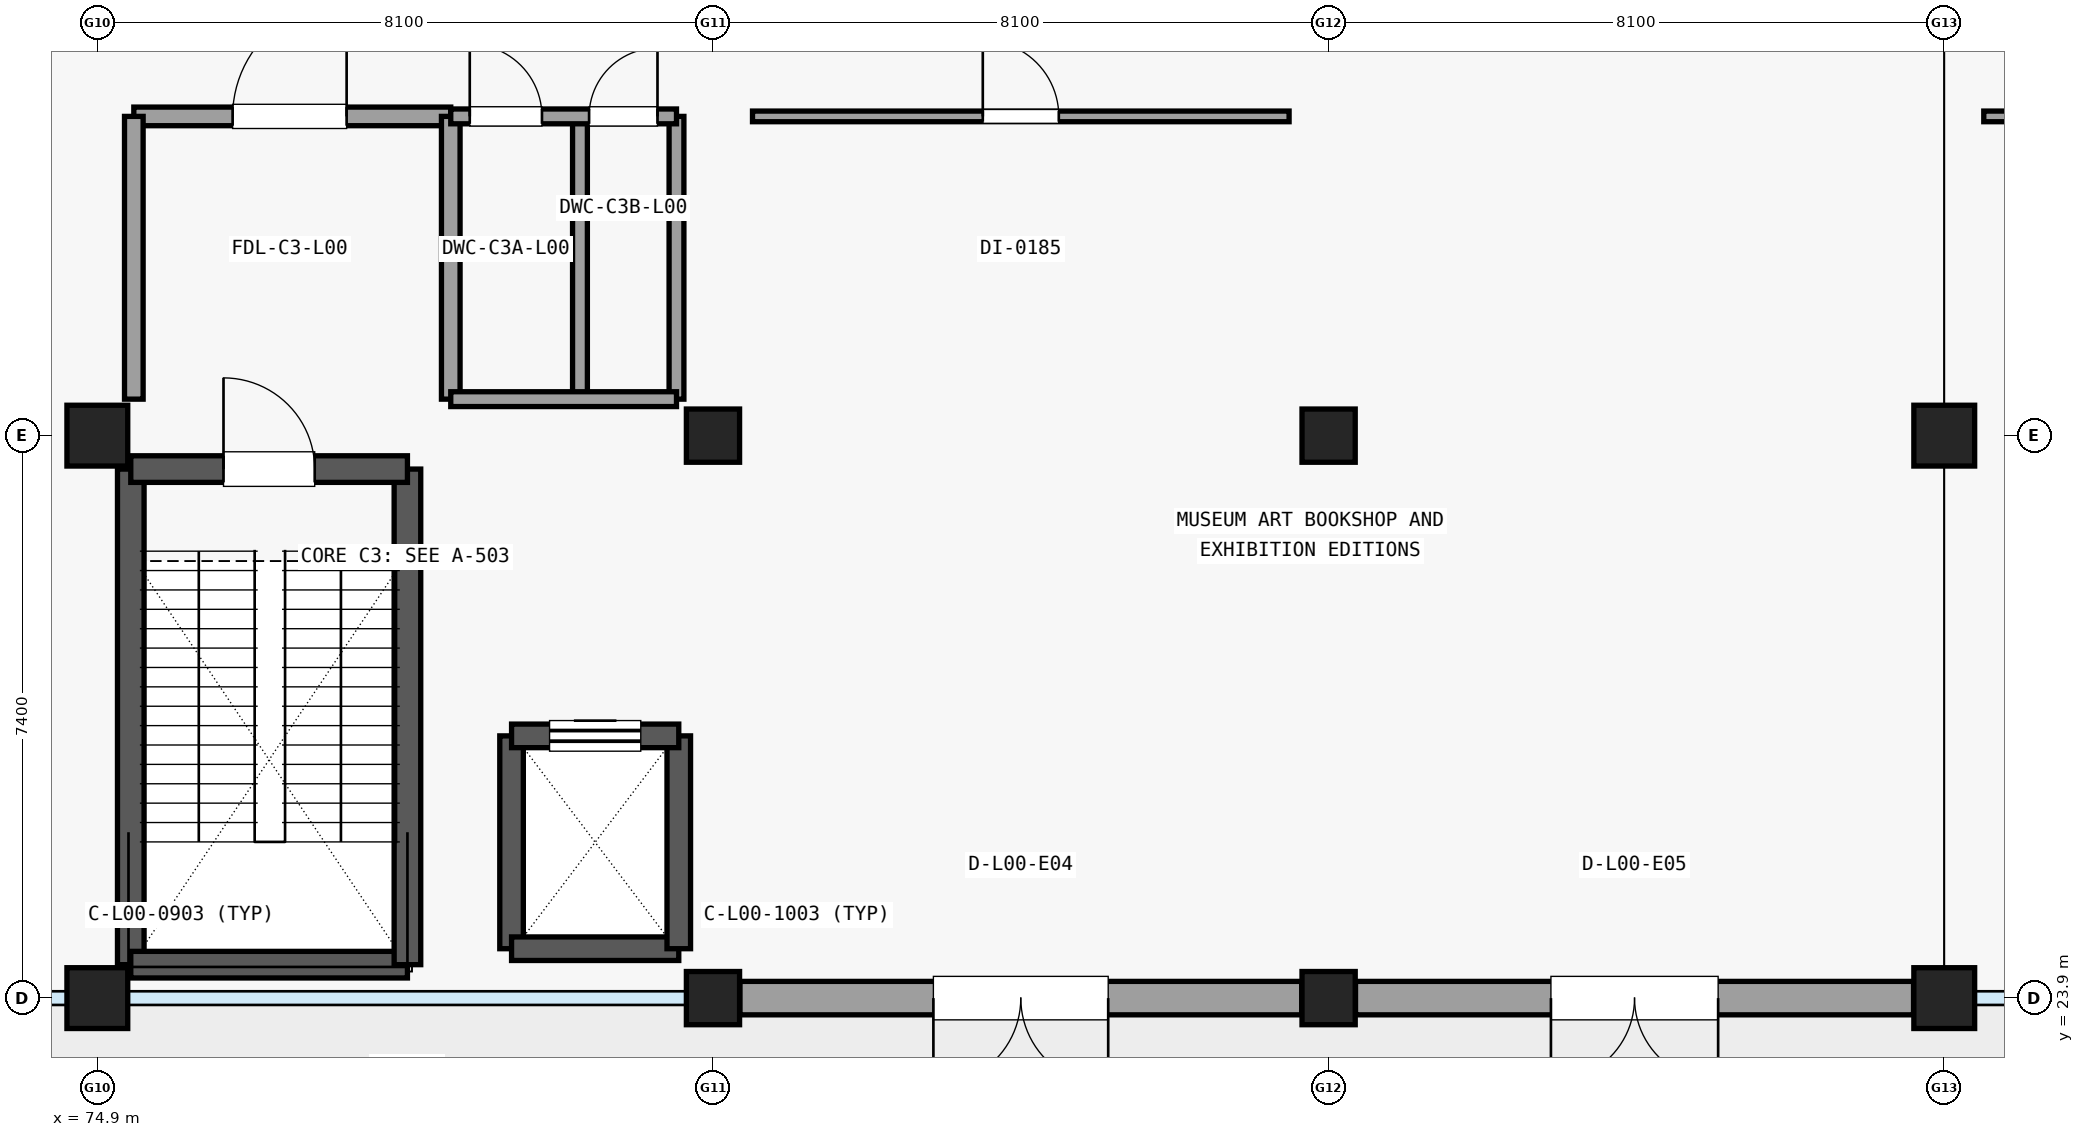
"""IFC4 building model, lengths in metres.
Left out: names, types, materials, properties, quantities, classifications, styles, units other than length and angle.
Written with IfcOpenShell. Run it as: python <this file> out.ifc"""

import sys

from ifc_helpers import new_model, si_unit, direction, frame, frame_2d, origin, origin_2d, place, context, subcontext, project, spatial, rectangle, extrude, element, fill, save


model = new_model("IFC4")
c1 = context("Model", 3, precision=1e-05, world=origin(), true_north=direction((0.0, 1.0)))
c2 = subcontext(c1, "Body", "Model", "MODEL_VIEW")
j1 = project(units=[si_unit("LENGTHUNIT", "METRE"), si_unit("PLANEANGLEUNIT", "RADIAN")], contexts=[c1])
p1 = place(None, origin())
s1 = spatial("IfcSite", under=j1, at=p1, CompositionType="ELEMENT")
p2 = place(p1, origin())
s2 = spatial("IfcBuilding", under=s1, at=p2, CompositionType="ELEMENT")
p3 = place(p2, origin())
s3 = spatial("IfcBuildingStorey", under=s2, at=p3, CompositionType="ELEMENT", Elevation=0.0)
for number, where, z_axis, x_axis in (
    (1, (74.9, 23.9, 0.0), (0.0, 0.0, 1.0), (1.0, 0.0, 0.0)),
    (2, (74.9, 31.3, 0.0), (0.0, 0.0, 1.0), (1.0, 0.0, 0.0)),
):
    element("IfcColumn", number, at=place(p3, frame(where, z_axis=z_axis, x_axis=x_axis)), inside=s3, PredefinedType="COLUMN", context=c2, shape_type="SweptSolid", body=[
        extrude(rectangle(XDim=0.8, YDim=0.8, at=origin_2d()), origin(), (0.0, 0.0, 1.0), 5.135),
    ])
for number, where, z_axis, x_axis in (
    (3, (83.0, 23.9, 0.0), (0.0, 0.0, 1.0), (1.0, 0.0, 0.0)),
    (4, (83.0, 31.3, 0.0), (0.0, 0.0, 1.0), (1.0, 0.0, 0.0)),
    (5, (91.1, 23.9, 0.0), (0.0, 0.0, 1.0), (1.0, 0.0, 0.0)),
    (6, (91.1, 31.3, 0.0), (0.0, 0.0, 1.0), (1.0, 0.0, 0.0)),
):
    element("IfcColumn", number, at=place(p3, frame(where, z_axis=z_axis, x_axis=x_axis)), inside=s3, PredefinedType="COLUMN", context=c2, shape_type="SweptSolid", body=[
        extrude(rectangle(XDim=0.7, YDim=0.7, at=origin_2d()), origin(), (0.0, 0.0, 1.0), 5.135),
    ])
for number, where, z_axis, x_axis in (
    (7, (99.2, 23.9, 0.0), (0.0, 0.0, 1.0), (1.0, 0.0, 0.0)),
    (8, (99.2, 31.3, 0.0), (0.0, 0.0, 1.0), (1.0, 0.0, 0.0)),
):
    element("IfcColumn", number, at=place(p3, frame(where, z_axis=z_axis, x_axis=x_axis)), inside=s3, PredefinedType="COLUMN", context=c2, shape_type="SweptSolid", body=[
        extrude(rectangle(XDim=0.8, YDim=0.8, at=origin_2d()), origin(), (0.0, 0.0, 1.0), 5.135),
    ])
p4 = place(p3, frame((90.746, 23.9, 0.0), z_axis=(0.0, 0.0, 1.0), x_axis=(-1.0, 0.0, 0.0)))
e9 = element("IfcWall", 9, at=p4, inside=s3, PredefinedType="SOLIDWALL", context=c2, shape_type="SweptSolid", body=[
    extrude(rectangle(XDim=7.392, YDim=0.44, at=frame_2d((3.696, 0.0))), origin(), (0.0, 0.0, 1.0), 4.27),
])
p5 = place(p4, frame((2.546, 0.0, 0.0)))
e10 = element("IfcOpeningElement", 10, at=p5, cuts=e9, PredefinedType="OPENING", context=c2, shape_type="SweptSolid", body=[
    extrude(rectangle(XDim=2.3, YDim=2.7, at=frame_2d((1.15, 1.35))), frame((0.0, 0.23, 0.0), z_axis=(0.0, -1.0, 0.0), x_axis=(1.0, 0.0, 0.0)), (0.0, 0.0, 1.0), 0.46),
])
p6 = place(p3, frame((98.796, 23.9, 0.0), z_axis=(0.0, 0.0, 1.0), x_axis=(-1.0, 0.0, 0.0)))
e11 = element("IfcWall", 11, at=p6, inside=s3, PredefinedType="SOLIDWALL", context=c2, shape_type="SweptSolid", body=[
    extrude(rectangle(XDim=7.342, YDim=0.44, at=frame_2d((3.671, 0.0))), origin(), (0.0, 0.0, 1.0), 4.27),
])
p7 = place(p6, frame((2.571, 0.0, 0.0)))
e12 = element("IfcOpeningElement", 12, at=p7, cuts=e11, PredefinedType="OPENING", context=c2, shape_type="SweptSolid", body=[
    extrude(rectangle(XDim=2.2, YDim=2.4, at=frame_2d((1.1, 1.2))), frame((0.0, 0.23, 0.0), z_axis=(0.0, -1.0, 0.0), x_axis=(1.0, 0.0, 0.0)), (0.0, 0.0, 1.0), 0.46),
])
p8 = place(p3, frame((75.34, 24.34, 0.0), z_axis=(0.0, 0.0, 1.0), x_axis=(0.0, 1.0, 0.0)))
e13 = element("IfcWall", 13, at=p8, inside=s3, PredefinedType="SHEAR", context=c2, shape_type="SweptSolid", body=[
    extrude(rectangle(XDim=6.52, YDim=0.35, at=frame_2d((3.26, 0.0))), origin(), (0.0, 0.0, 1.0), 5.13),
])
p9 = place(p3, frame((75.34, 24.34, 0.0), z_axis=(0.0, 0.0, 1.0), x_axis=(1.0, 0.0, 0.0)))
e14 = element("IfcWall", 14, at=p9, inside=s3, PredefinedType="SHEAR", context=c2, shape_type="SweptSolid", body=[
    extrude(rectangle(XDim=3.64, YDim=0.35, at=frame_2d((1.82, 0.0))), origin(), (0.0, 0.0, 1.0), 5.13),
])
p10 = place(p3, frame((78.98, 24.34, 0.0), z_axis=(0.0, 0.0, 1.0), x_axis=(0.0, 1.0, 0.0)))
e15 = element("IfcWall", 15, at=p10, inside=s3, PredefinedType="SHEAR", context=c2, shape_type="SweptSolid", body=[
    extrude(rectangle(XDim=6.52, YDim=0.35, at=frame_2d((3.26, 0.0))), origin(), (0.0, 0.0, 1.0), 5.13),
])
p11 = place(p3, frame((75.34, 30.86, 0.0), z_axis=(0.0, 0.0, 1.0), x_axis=(1.0, 0.0, 0.0)))
e16 = element("IfcWall", 16, at=p11, inside=s3, PredefinedType="SHEAR", context=c2, shape_type="SweptSolid", body=[
    extrude(rectangle(XDim=3.64, YDim=0.35, at=frame_2d((1.82, 0.0))), origin(), (0.0, 0.0, 1.0), 5.13),
])
p12 = place(p11, frame((1.22, 0.0, 0.0)))
e17 = element("IfcOpeningElement", 17, at=p12, cuts=e16, PredefinedType="OPENING", context=c2, shape_type="SweptSolid", body=[
    extrude(rectangle(XDim=1.2, YDim=2.15, at=frame_2d((0.6, 1.075))), frame((0.0, 0.185, 0.0), z_axis=(0.0, -1.0, 0.0), x_axis=(1.0, 0.0, 0.0)), (0.0, 0.0, 1.0), 0.37),
])
p13 = place(p3, frame((80.35, 24.55, 0.0), z_axis=(0.0, 0.0, 1.0), x_axis=(0.0, 1.0, 0.0)))
e18 = element("IfcWall", 18, at=p13, inside=s3, PredefinedType="SHEAR", context=c2, shape_type="SweptSolid", body=[
    extrude(rectangle(XDim=2.8, YDim=0.31, at=frame_2d((1.4, 0.0))), origin(), (0.0, 0.0, 1.0), 5.13),
])
p14 = place(p3, frame((80.35, 24.55, 0.0), z_axis=(0.0, 0.0, 1.0), x_axis=(1.0, 0.0, 0.0)))
e19 = element("IfcWall", 19, at=p14, inside=s3, PredefinedType="SHEAR", context=c2, shape_type="SweptSolid", body=[
    extrude(rectangle(XDim=2.2, YDim=0.31, at=frame_2d((1.1, 0.0))), origin(), (0.0, 0.0, 1.0), 5.13),
])
p15 = place(p3, frame((82.55, 24.55, 0.0), z_axis=(0.0, 0.0, 1.0), x_axis=(0.0, 1.0, 0.0)))
e20 = element("IfcWall", 20, at=p15, inside=s3, PredefinedType="SHEAR", context=c2, shape_type="SweptSolid", body=[
    extrude(rectangle(XDim=2.8, YDim=0.31, at=frame_2d((1.4, 0.0))), origin(), (0.0, 0.0, 1.0), 5.13),
])
p16 = place(p3, frame((80.35, 27.35, 0.0), z_axis=(0.0, 0.0, 1.0), x_axis=(1.0, 0.0, 0.0)))
e21 = element("IfcWall", 21, at=p16, inside=s3, PredefinedType="SHEAR", context=c2, shape_type="SweptSolid", body=[
    extrude(rectangle(XDim=2.2, YDim=0.31, at=frame_2d((1.1, 0.0))), origin(), (0.0, 0.0, 1.0), 5.13),
])
p17 = place(p16, frame((0.5, 0.0, 0.0)))
e22 = element("IfcOpeningElement", 22, at=p17, cuts=e21, PredefinedType="OPENING", context=c2, shape_type="SweptSolid", body=[
    extrude(rectangle(XDim=1.2, YDim=2.15, at=frame_2d((0.6, 1.075))), frame((0.0, 0.165, 0.0), z_axis=(0.0, -1.0, 0.0), x_axis=(1.0, 0.0, 0.0)), (0.0, 0.0, 1.0), 0.33),
])
p18 = place(p3, frame((75.38, 35.5, 0.0), z_axis=(0.0, 0.0, 1.0), x_axis=(1.0, 0.0, 0.0)))
e23 = element("IfcWall", 23, at=p18, inside=s3, PredefinedType="PARTITIONING", context=c2, shape_type="SweptSolid", body=[
    extrude(rectangle(XDim=4.17, YDim=0.245, at=frame_2d((2.085, 0.0))), origin(), (0.0, 0.0, 1.0), 4.275),
])
p19 = place(p18, frame((1.3, 0.0, 0.0)))
e24 = element("IfcOpeningElement", 24, at=p19, cuts=e23, PredefinedType="OPENING", context=c2, shape_type="SweptSolid", body=[
    extrude(rectangle(XDim=1.5, YDim=2.15, at=frame_2d((0.75, 1.075))), frame((0.0, 0.133, 0.0), z_axis=(0.0, -1.0, 0.0), x_axis=(1.0, 0.0, 0.0)), (0.0, 0.0, 1.0), 0.265),
])
for number, where, z_axis, x_axis in (
    (25, (75.38, 31.78, 0.0), (0.0, 0.0, 1.0), (0.0, 1.0, 0.0)),
    (26, (79.55, 31.78, 0.0), (0.0, 0.0, 1.0), (0.0, 1.0, 0.0)),
):
    element("IfcWall", number, at=place(p3, frame(where, z_axis=z_axis, x_axis=x_axis)), inside=s3, PredefinedType="PARTITIONING", context=c2, shape_type="SweptSolid", body=[
        extrude(rectangle(XDim=3.72, YDim=0.245, at=frame_2d((1.86, 0.0))), origin(), (0.0, 0.0, 1.0), 4.275),
    ])
for number, where, z_axis, x_axis in (
    (27, (81.25, 31.78, 0.0), (0.0, 0.0, 1.0), (0.0, 1.0, 0.0)),
    (28, (82.52, 31.78, 0.0), (0.0, 0.0, 1.0), (0.0, 1.0, 0.0)),
):
    element("IfcWall", number, at=place(p3, frame(where, z_axis=z_axis, x_axis=x_axis)), inside=s3, PredefinedType="PARTITIONING", context=c2, shape_type="SweptSolid", body=[
        extrude(rectangle(XDim=3.72, YDim=0.195, at=frame_2d((1.86, 0.0))), origin(), (0.0, 0.0, 1.0), 4.275),
    ])
p20 = place(p3, frame((79.55, 31.78, 0.0), z_axis=(0.0, 0.0, 1.0), x_axis=(1.0, 0.0, 0.0)))
e29 = element("IfcWall", 29, at=p20, inside=s3, PredefinedType="PARTITIONING", context=c2, shape_type="SweptSolid", body=[
    extrude(rectangle(XDim=2.97, YDim=0.195, at=frame_2d((1.485, 0.0))), origin(), (0.0, 0.0, 1.0), 4.275),
])
p21 = place(p3, frame((79.55, 35.5, 0.0), z_axis=(0.0, 0.0, 1.0), x_axis=(1.0, 0.0, 0.0)))
e30 = element("IfcWall", 30, at=p21, inside=s3, PredefinedType="PARTITIONING", context=c2, shape_type="SweptSolid", body=[
    extrude(rectangle(XDim=2.97, YDim=0.195, at=frame_2d((1.485, 0.0))), origin(), (0.0, 0.0, 1.0), 5.12),
])
p22 = place(p21, frame((0.25, 0.0, 0.0)))
e31 = element("IfcOpeningElement", 31, at=p22, cuts=e30, PredefinedType="OPENING", context=c2, shape_type="SweptSolid", body=[
    extrude(rectangle(XDim=0.95, YDim=2.1, at=frame_2d((0.475, 1.05))), frame((0.0, 0.107, 0.0), z_axis=(0.0, -1.0, 0.0), x_axis=(1.0, 0.0, 0.0)), (0.0, 0.0, 1.0), 0.215),
])
p23 = place(p21, frame((1.82, 0.0, 0.0)))
e32 = element("IfcOpeningElement", 32, at=p23, cuts=e30, PredefinedType="OPENING", context=c2, shape_type="SweptSolid", body=[
    extrude(rectangle(XDim=0.9, YDim=2.1, at=frame_2d((0.45, 1.05))), frame((0.0, 0.107, 0.0), z_axis=(0.0, -1.0, 0.0), x_axis=(1.0, 0.0, 0.0)), (0.0, 0.0, 1.0), 0.215),
])
p24 = place(p3, frame((83.52, 35.5, 0.0), z_axis=(0.0, 0.0, 1.0), x_axis=(1.0, 0.0, 0.0)))
e33 = element("IfcWall", 33, at=p24, inside=s3, PredefinedType="PARTITIONING", context=c2, shape_type="SweptSolid", body=[
    extrude(rectangle(XDim=7.06, YDim=0.14, at=frame_2d((3.53, 0.0))), origin(), (0.0, 0.0, 1.0), 5.12),
])
p25 = place(p24, frame((3.03, 0.0, 0.0)))
e34 = element("IfcOpeningElement", 34, at=p25, cuts=e33, PredefinedType="OPENING", context=c2, shape_type="SweptSolid", body=[
    extrude(rectangle(XDim=1.0, YDim=2.12, at=frame_2d((0.5, 1.06))), frame((0.0, 0.08, 0.0), z_axis=(0.0, -1.0, 0.0), x_axis=(1.0, 0.0, 0.0)), (0.0, 0.0, 1.0), 0.16),
])
p26 = place(p3, frame((99.72, 35.5, 0.0), z_axis=(0.0, 0.0, 1.0), x_axis=(1.0, 0.0, 0.0)))
e35 = element("IfcWall", 35, at=p26, inside=s3, PredefinedType="PARTITIONING", context=c2, shape_type="SweptSolid", body=[
    extrude(rectangle(XDim=7.06, YDim=0.14, at=frame_2d((3.53, 0.0))), origin(), (0.0, 0.0, 1.0), 4.325),
])
p27 = place(p26, frame((3.03, 0.0, 0.0)))
e36 = element("IfcOpeningElement", 36, at=p27, cuts=e35, PredefinedType="OPENING", context=c2, shape_type="SweptSolid", body=[
    extrude(rectangle(XDim=1.0, YDim=2.12, at=frame_2d((0.5, 1.06))), frame((0.0, 0.08, 0.0), z_axis=(0.0, -1.0, 0.0), x_axis=(1.0, 0.0, 0.0)), (0.0, 0.0, 1.0), 0.16),
])
p28 = place(p5, origin())
e37 = element("IfcDoor", 37, at=p28, inside=s3, OperationType="DOUBLE_SWING_LEFT", PredefinedType="DOOR", context=c2, shape_type="SweptSolid", body=[
    extrude(rectangle(XDim=2.3, YDim=2.7, at=frame_2d((1.15, 1.35))), frame((0.0, 0.025, 0.0), z_axis=(0.0, -1.0, 0.0), x_axis=(1.0, 0.0, 0.0)), (0.0, 0.0, 1.0), 0.05),
])
fill(e10, e37)
p29 = place(p7, origin())
e38 = element("IfcDoor", 38, at=p29, inside=s3, OperationType="DOUBLE_SWING_LEFT", PredefinedType="DOOR", context=c2, shape_type="SweptSolid", body=[
    extrude(rectangle(XDim=2.2, YDim=2.4, at=frame_2d((1.1, 1.2))), frame((0.0, 0.025, 0.0), z_axis=(0.0, -1.0, 0.0), x_axis=(1.0, 0.0, 0.0)), (0.0, 0.0, 1.0), 0.05),
])
fill(e12, e38)
p30 = place(p12, origin())
e39 = element("IfcDoor", 39, at=p30, inside=s3, OperationType="SINGLE_SWING_LEFT", PredefinedType="DOOR", context=c2, shape_type="SweptSolid", body=[
    extrude(rectangle(XDim=1.2, YDim=2.15, at=frame_2d((0.6, 1.075))), frame((0.0, 0.025, 0.0), z_axis=(0.0, -1.0, 0.0), x_axis=(1.0, 0.0, 0.0)), (0.0, 0.0, 1.0), 0.05),
])
fill(e17, e39)
p31 = place(p17, origin())
e40 = element("IfcDoor", 40, at=p31, inside=s3, OperationType="SLIDING_TO_RIGHT", PredefinedType="DOOR", context=c2, shape_type="SweptSolid", body=[
    extrude(rectangle(XDim=1.2, YDim=2.15, at=frame_2d((0.6, 1.075))), frame((0.0, 0.025, 0.0), z_axis=(0.0, -1.0, 0.0), x_axis=(1.0, 0.0, 0.0)), (0.0, 0.0, 1.0), 0.05),
])
fill(e22, e40)
p32 = place(p19, origin())
e41 = element("IfcDoor", 41, at=p32, inside=s3, OperationType="SINGLE_SWING_RIGHT", PredefinedType="DOOR", context=c2, shape_type="SweptSolid", body=[
    extrude(rectangle(XDim=1.5, YDim=2.15, at=frame_2d((0.75, 1.075))), frame((0.0, 0.025, 0.0), z_axis=(0.0, -1.0, 0.0), x_axis=(1.0, 0.0, 0.0)), (0.0, 0.0, 1.0), 0.05),
])
fill(e24, e41)
p33 = place(p22, origin())
e42 = element("IfcDoor", 42, at=p33, inside=s3, OperationType="SINGLE_SWING_LEFT", PredefinedType="DOOR", context=c2, shape_type="SweptSolid", body=[
    extrude(rectangle(XDim=0.95, YDim=2.1, at=frame_2d((0.475, 1.05))), frame((0.0, 0.025, 0.0), z_axis=(0.0, -1.0, 0.0), x_axis=(1.0, 0.0, 0.0)), (0.0, 0.0, 1.0), 0.05),
])
fill(e31, e42)
p34 = place(p23, origin())
e43 = element("IfcDoor", 43, at=p34, inside=s3, OperationType="SINGLE_SWING_RIGHT", PredefinedType="DOOR", context=c2, shape_type="SweptSolid", body=[
    extrude(rectangle(XDim=0.9, YDim=2.1, at=frame_2d((0.45, 1.05))), frame((0.0, 0.025, 0.0), z_axis=(0.0, -1.0, 0.0), x_axis=(1.0, 0.0, 0.0)), (0.0, 0.0, 1.0), 0.05),
])
fill(e32, e43)
p35 = place(p25, origin())
e44 = element("IfcDoor", 44, at=p35, inside=s3, OperationType="SINGLE_SWING_LEFT", PredefinedType="DOOR", context=c2, shape_type="SweptSolid", body=[
    extrude(rectangle(XDim=1.0, YDim=2.12, at=frame_2d((0.5, 1.06))), frame((0.0, 0.025, 0.0), z_axis=(0.0, -1.0, 0.0), x_axis=(1.0, 0.0, 0.0)), (0.0, 0.0, 1.0), 0.05),
])
fill(e34, e44)
save(model, sys.argv[1])
